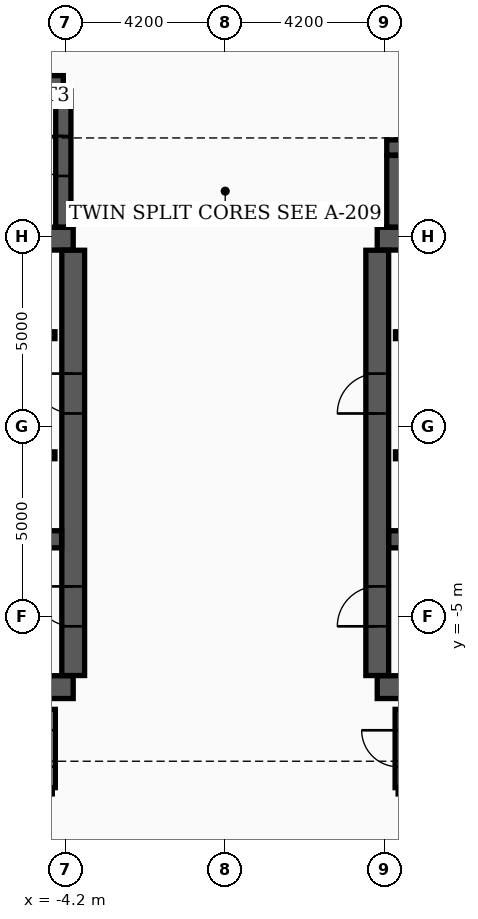
"""IFC4 building model, lengths in metres.
Left out: names, types, materials, properties, quantities, classifications, styles, units other than length and angle.
Written with IfcOpenShell. Run it as: python <this file> out.ifc"""

import sys

from ifc_helpers import new_model, si_unit, direction, frame, frame_2d, origin, place, context, subcontext, project, spatial, rectangle, extrude, element, fill, save


model = new_model("IFC4")
c1 = context("Model", 3, precision=1e-05, world=origin(), true_north=direction((0.0, 1.0)))
c2 = subcontext(c1, "Body", "Model", "MODEL_VIEW")
j1 = project(units=[si_unit("LENGTHUNIT", "METRE"), si_unit("PLANEANGLEUNIT", "RADIAN")], contexts=[c1])
p1 = place(None, origin())
s1 = spatial("IfcSite", under=j1, at=p1, CompositionType="ELEMENT")
p2 = place(p1, origin())
s2 = spatial("IfcBuilding", under=s1, at=p2, CompositionType="ELEMENT")
p3 = place(p2, frame((0.0, 0.0, 160.5)))
s3 = spatial("IfcBuildingStorey", under=s2, at=p3, CompositionType="ELEMENT", Elevation=160.5)
for number, where, z_axis, x_axis in (
    (1, (-12.4, -6.85, 0.0), (0.0, 0.0, 1.0), (1.0, 0.0, 0.0)),
    (2, (-12.4, 4.95, 0.0), (0.0, 0.0, 1.0), (1.0, 0.0, 0.0)),
):
    element("IfcWall", number, at=place(p3, frame(where, z_axis=z_axis, x_axis=x_axis)), inside=s3, PredefinedType="SHEAR", context=c2, shape_type="SweptSolid", body=[
        extrude(rectangle(XDim=8.4, YDim=0.6, at=frame_2d((4.2, 0.0))), origin(), (0.0, 0.0, 1.0), 3.7),
    ])
p4 = place(p3, frame((-4.0, -6.545, 0.0), z_axis=(0.0, 0.0, 1.0), x_axis=(0.0, 1.0, 0.0)))
e3 = element("IfcWall", 3, at=p4, inside=s3, PredefinedType="SHEAR", context=c2, shape_type="SweptSolid", body=[
    extrude(rectangle(XDim=11.19, YDim=0.6, at=frame_2d((5.595, 0.0))), origin(), (0.0, 0.0, 1.0), 3.7),
])
p5 = place(p4, frame((1.295, 0.0, 0.0)))
e4 = element("IfcOpeningElement", 4, at=p5, cuts=e3, PredefinedType="OPENING", context=c2, shape_type="SweptSolid", body=[
    extrude(rectangle(XDim=1.05, YDim=2.15, at=frame_2d((0.525, 1.075))), frame((0.0, 0.31, 0.0), z_axis=(0.0, -1.0, 0.0), x_axis=(1.0, 0.0, 0.0)), (0.0, 0.0, 1.0), 0.62),
])
p6 = place(p4, frame((6.895, 0.0, 0.0)))
e5 = element("IfcOpeningElement", 5, at=p6, cuts=e3, PredefinedType="OPENING", context=c2, shape_type="SweptSolid", body=[
    extrude(rectangle(XDim=1.05, YDim=2.15, at=frame_2d((0.525, 1.075))), frame((0.0, 0.31, 0.0), z_axis=(0.0, -1.0, 0.0), x_axis=(1.0, 0.0, 0.0)), (0.0, 0.0, 1.0), 0.62),
])
p7 = place(p3, frame((-12.095, -2.96, 0.0), z_axis=(0.0, 0.0, 1.0), x_axis=(1.0, 0.0, 0.0)))
e6 = element("IfcWall", 6, at=p7, inside=s3, PredefinedType="SHEAR", context=c2, shape_type="SweptSolid", body=[
    extrude(rectangle(XDim=7.79, YDim=0.45, at=frame_2d((3.895, 0.0))), origin(), (0.0, 0.0, 1.0), 3.7),
])
for number, where, z_axis, x_axis in (
    (7, (4.0, -6.85, 0.0), (0.0, 0.0, 1.0), (1.0, 0.0, 0.0)),
    (8, (4.0, 4.95, 0.0), (0.0, 0.0, 1.0), (1.0, 0.0, 0.0)),
):
    element("IfcWall", number, at=place(p3, frame(where, z_axis=z_axis, x_axis=x_axis)), inside=s3, PredefinedType="SHEAR", context=c2, shape_type="SweptSolid", body=[
        extrude(rectangle(XDim=8.4, YDim=0.6, at=frame_2d((4.2, 0.0))), origin(), (0.0, 0.0, 1.0), 3.7),
    ])
p8 = place(p3, frame((4.0, -6.545, 0.0), z_axis=(0.0, 0.0, 1.0), x_axis=(0.0, 1.0, 0.0)))
e9 = element("IfcWall", 9, at=p8, inside=s3, PredefinedType="SHEAR", context=c2, shape_type="SweptSolid", body=[
    extrude(rectangle(XDim=11.19, YDim=0.6, at=frame_2d((5.595, 0.0))), origin(), (0.0, 0.0, 1.0), 3.7),
])
p9 = place(p8, frame((1.295, 0.0, 0.0)))
e10 = element("IfcOpeningElement", 10, at=p9, cuts=e9, PredefinedType="OPENING", context=c2, shape_type="SweptSolid", body=[
    extrude(rectangle(XDim=1.05, YDim=2.15, at=frame_2d((0.525, 1.075))), frame((0.0, 0.31, 0.0), z_axis=(0.0, -1.0, 0.0), x_axis=(1.0, 0.0, 0.0)), (0.0, 0.0, 1.0), 0.62),
])
p10 = place(p8, frame((6.895, 0.0, 0.0)))
e11 = element("IfcOpeningElement", 11, at=p10, cuts=e9, PredefinedType="OPENING", context=c2, shape_type="SweptSolid", body=[
    extrude(rectangle(XDim=1.05, YDim=2.15, at=frame_2d((0.525, 1.075))), frame((0.0, 0.31, 0.0), z_axis=(0.0, -1.0, 0.0), x_axis=(1.0, 0.0, 0.0)), (0.0, 0.0, 1.0), 0.62),
])
p11 = place(p3, frame((4.305, -2.96, 0.0), z_axis=(0.0, 0.0, 1.0), x_axis=(1.0, 0.0, 0.0)))
e12 = element("IfcWall", 12, at=p11, inside=s3, PredefinedType="SHEAR", context=c2, shape_type="SweptSolid", body=[
    extrude(rectangle(XDim=7.79, YDim=0.45, at=frame_2d((3.895, 0.0))), origin(), (0.0, 0.0, 1.0), 3.7),
])
p12 = place(p3, frame((-12.22, 9.04, 0.0), z_axis=(0.0, 0.0, 1.0), x_axis=(1.0, 0.0, 0.0)))
e13 = element("IfcWall", 13, at=p12, inside=s3, PredefinedType="SHEAR", context=c2, shape_type="SweptSolid", body=[
    extrude(rectangle(XDim=7.96, YDim=0.4, at=frame_2d((3.98, 0.0))), origin(), (0.0, 0.0, 1.0), 3.7),
])
p13 = place(p3, frame((-4.26, 5.255, 0.0), z_axis=(0.0, 0.0, 1.0), x_axis=(0.0, 1.0, 0.0)))
e14 = element("IfcWall", 14, at=p13, inside=s3, PredefinedType="SHEAR", context=c2, shape_type="SweptSolid", body=[
    extrude(rectangle(XDim=3.58, YDim=0.4, at=frame_2d((1.79, 0.0))), origin(), (0.0, 0.0, 1.0), 3.7),
])
p14 = place(p13, frame((1.345, 0.0, 0.0)))
e15 = element("IfcOpeningElement", 15, at=p14, cuts=e14, PredefinedType="OPENING", context=c2, shape_type="SweptSolid", body=[
    extrude(rectangle(XDim=1.05, YDim=2.15, at=frame_2d((0.525, 1.075))), frame((0.0, 0.21, 0.0), z_axis=(0.0, -1.0, 0.0), x_axis=(1.0, 0.0, 0.0)), (0.0, 0.0, 1.0), 0.42),
])
p15 = place(p3, frame((4.45, 5.255, 0.0), z_axis=(0.0, 0.0, 1.0), x_axis=(0.0, 1.0, 0.0)))
e16 = element("IfcWall", 16, at=p15, inside=s3, PredefinedType="SHEAR", context=c2, shape_type="SweptSolid", body=[
    extrude(rectangle(XDim=1.885, YDim=0.4, at=frame_2d((0.942, 0.0))), origin(), (0.0, 0.0, 1.0), 3.7),
])
p16 = place(p3, frame((4.25, 7.35, 0.0), z_axis=(0.0, 0.0, 1.0), x_axis=(1.0, 0.0, 0.0)))
e17 = element("IfcWall", 17, at=p16, inside=s3, PredefinedType="SHEAR", context=c2, shape_type="SweptSolid", body=[
    extrude(rectangle(XDim=5.4, YDim=0.4, at=frame_2d((2.7, 0.0))), origin(), (0.0, 0.0, 1.0), 3.7),
])
p17 = place(p3, frame((-11.9, 2.41, 0.0), z_axis=(0.0, 0.0, 1.0), x_axis=(1.0, 0.0, 0.0)))
e18 = element("IfcWall", 18, at=p17, inside=s3, PredefinedType="SOLIDWALL", context=c2, shape_type="SweptSolid", body=[
    extrude(rectangle(XDim=7.42, YDim=0.18, at=frame_2d((3.71, 0.0))), origin(), (0.0, 0.0, 1.0), 2.96),
])
p18 = place(p17, frame((0.55, 0.0, 0.0)))
e19 = element("IfcOpeningElement", 19, at=p18, cuts=e18, PredefinedType="OPENING", context=c2, shape_type="SweptSolid", body=[
    extrude(rectangle(XDim=1.1, YDim=2.15, at=frame_2d((0.55, 1.075))), frame((0.0, 0.1, 0.0), z_axis=(0.0, -1.0, 0.0), x_axis=(1.0, 0.0, 0.0)), (0.0, 0.0, 1.0), 0.2),
])
p19 = place(p17, frame((4.9, 0.0, 0.0)))
e20 = element("IfcOpeningElement", 20, at=p19, cuts=e18, PredefinedType="OPENING", context=c2, shape_type="SweptSolid", body=[
    extrude(rectangle(XDim=0.88, YDim=2.1, at=frame_2d((0.44, 1.05))), frame((0.0, 0.1, 0.0), z_axis=(0.0, -1.0, 0.0), x_axis=(1.0, 0.0, 0.0)), (0.0, 0.0, 1.0), 0.2),
])
p20 = place(p3, frame((4.48, 2.41, 0.0), z_axis=(0.0, 0.0, 1.0), x_axis=(1.0, 0.0, 0.0)))
e21 = element("IfcWall", 21, at=p20, inside=s3, PredefinedType="SOLIDWALL", context=c2, shape_type="SweptSolid", body=[
    extrude(rectangle(XDim=7.42, YDim=0.18, at=frame_2d((3.71, 0.0))), origin(), (0.0, 0.0, 1.0), 2.96),
])
p21 = place(p20, frame((5.67, 0.0, 0.0)))
e22 = element("IfcOpeningElement", 22, at=p21, cuts=e21, PredefinedType="OPENING", context=c2, shape_type="SweptSolid", body=[
    extrude(rectangle(XDim=1.1, YDim=2.15, at=frame_2d((0.55, 1.075))), frame((0.0, 0.1, 0.0), z_axis=(0.0, -1.0, 0.0), x_axis=(1.0, 0.0, 0.0)), (0.0, 0.0, 1.0), 0.2),
])
p22 = place(p20, frame((1.6, 0.0, 0.0)))
e23 = element("IfcOpeningElement", 23, at=p22, cuts=e21, PredefinedType="OPENING", context=c2, shape_type="SweptSolid", body=[
    extrude(rectangle(XDim=0.88, YDim=2.1, at=frame_2d((0.44, 1.05))), frame((0.0, 0.1, 0.0), z_axis=(0.0, -1.0, 0.0), x_axis=(1.0, 0.0, 0.0)), (0.0, 0.0, 1.0), 0.2),
])
p23 = place(p3, frame((-11.9, -0.75, 0.0), z_axis=(0.0, 0.0, 1.0), x_axis=(1.0, 0.0, 0.0)))
e24 = element("IfcWall", 24, at=p23, inside=s3, PredefinedType="SOLIDWALL", context=c2, shape_type="SweptSolid", body=[
    extrude(rectangle(XDim=7.42, YDim=0.18, at=frame_2d((3.71, 0.0))), origin(), (0.0, 0.0, 1.0), 2.96),
])
p24 = place(p23, frame((0.45, 0.0, 0.0)))
e25 = element("IfcOpeningElement", 25, at=p24, cuts=e24, PredefinedType="OPENING", context=c2, shape_type="SweptSolid", body=[
    extrude(rectangle(XDim=1.1, YDim=2.15, at=frame_2d((0.55, 1.075))), frame((0.0, 0.1, 0.0), z_axis=(0.0, -1.0, 0.0), x_axis=(1.0, 0.0, 0.0)), (0.0, 0.0, 1.0), 0.2),
])
p25 = place(p23, frame((2.35, 0.0, 0.0)))
e26 = element("IfcOpeningElement", 26, at=p25, cuts=e24, PredefinedType="OPENING", context=c2, shape_type="SweptSolid", body=[
    extrude(rectangle(XDim=1.1, YDim=2.15, at=frame_2d((0.55, 1.075))), frame((0.0, 0.1, 0.0), z_axis=(0.0, -1.0, 0.0), x_axis=(1.0, 0.0, 0.0)), (0.0, 0.0, 1.0), 0.2),
])
p26 = place(p3, frame((4.48, -0.75, 0.0), z_axis=(0.0, 0.0, 1.0), x_axis=(1.0, 0.0, 0.0)))
e27 = element("IfcWall", 27, at=p26, inside=s3, PredefinedType="SOLIDWALL", context=c2, shape_type="SweptSolid", body=[
    extrude(rectangle(XDim=7.42, YDim=0.18, at=frame_2d((3.71, 0.0))), origin(), (0.0, 0.0, 1.0), 2.96),
])
p27 = place(p26, frame((0.52, 0.0, 0.0)))
e28 = element("IfcOpeningElement", 28, at=p27, cuts=e27, PredefinedType="OPENING", context=c2, shape_type="SweptSolid", body=[
    extrude(rectangle(XDim=1.1, YDim=2.15, at=frame_2d((0.55, 1.075))), frame((0.0, 0.1, 0.0), z_axis=(0.0, -1.0, 0.0), x_axis=(1.0, 0.0, 0.0)), (0.0, 0.0, 1.0), 0.2),
])
p28 = place(p3, frame((4.55, -9.58, 0.0), z_axis=(0.0, 0.0, 1.0), x_axis=(1.0, 0.0, 0.0)))
e29 = element("IfcWall", 29, at=p28, inside=s3, PredefinedType="PARTITIONING", context=c2, shape_type="SweptSolid", body=[
    extrude(rectangle(XDim=8.1, YDim=0.16, at=frame_2d((4.05, 0.0))), origin(), (0.0, 0.0, 1.0), 2.96),
])
p29 = place(p3, frame((4.55, -9.495, 0.0), z_axis=(0.0, 0.0, 1.0), x_axis=(0.0, 1.0, 0.0)))
e30 = element("IfcWall", 30, at=p29, inside=s3, PredefinedType="PARTITIONING", context=c2, shape_type="SweptSolid", body=[
    extrude(rectangle(XDim=2.06, YDim=0.16, at=frame_2d((1.03, 0.0))), origin(), (0.0, 0.0, 1.0), 2.96),
])
p30 = place(p29, frame((0.55, 0.0, 0.0)))
e31 = element("IfcOpeningElement", 31, at=p30, cuts=e30, PredefinedType="OPENING", context=c2, shape_type="SweptSolid", body=[
    extrude(rectangle(XDim=0.96, YDim=2.15, at=frame_2d((0.48, 1.075))), frame((0.0, 0.09, 0.0), z_axis=(0.0, -1.0, 0.0), x_axis=(1.0, 0.0, 0.0)), (0.0, 0.0, 1.0), 0.18),
])
p31 = place(p3, frame((-4.55, -9.495, 0.0), z_axis=(0.0, 0.0, 1.0), x_axis=(0.0, 1.0, 0.0)))
e32 = element("IfcWall", 32, at=p31, inside=s3, PredefinedType="PARTITIONING", context=c2, shape_type="SweptSolid", body=[
    extrude(rectangle(XDim=2.06, YDim=0.16, at=frame_2d((1.03, 0.0))), origin(), (0.0, 0.0, 1.0), 2.96),
])
p32 = place(p31, frame((0.55, 0.0, 0.0)))
e33 = element("IfcOpeningElement", 33, at=p32, cuts=e32, PredefinedType="OPENING", context=c2, shape_type="SweptSolid", body=[
    extrude(rectangle(XDim=0.96, YDim=2.15, at=frame_2d((0.48, 1.075))), frame((0.0, 0.09, 0.0), z_axis=(0.0, -1.0, 0.0), x_axis=(1.0, 0.0, 0.0)), (0.0, 0.0, 1.0), 0.18),
])
p33 = place(p5, origin())
e34 = element("IfcDoor", 34, at=p33, inside=s3, OperationType="SINGLE_SWING_RIGHT", PredefinedType="DOOR", context=c2, shape_type="SweptSolid", body=[
    extrude(rectangle(XDim=1.05, YDim=2.15, at=frame_2d((0.525, 1.075))), frame((0.0, 0.025, 0.0), z_axis=(0.0, -1.0, 0.0), x_axis=(1.0, 0.0, 0.0)), (0.0, 0.0, 1.0), 0.05),
])
fill(e4, e34)
p34 = place(p9, origin())
e35 = element("IfcDoor", 35, at=p34, inside=s3, OperationType="SINGLE_SWING_LEFT", PredefinedType="DOOR", context=c2, shape_type="SweptSolid", body=[
    extrude(rectangle(XDim=1.05, YDim=2.15, at=frame_2d((0.525, 1.075))), frame((0.0, 0.025, 0.0), z_axis=(0.0, -1.0, 0.0), x_axis=(1.0, 0.0, 0.0)), (0.0, 0.0, 1.0), 0.05),
])
fill(e10, e35)
p35 = place(p6, origin())
e36 = element("IfcDoor", 36, at=p35, inside=s3, OperationType="SINGLE_SWING_RIGHT", PredefinedType="DOOR", context=c2, shape_type="SweptSolid", body=[
    extrude(rectangle(XDim=1.05, YDim=2.15, at=frame_2d((0.525, 1.075))), frame((0.0, 0.025, 0.0), z_axis=(0.0, -1.0, 0.0), x_axis=(1.0, 0.0, 0.0)), (0.0, 0.0, 1.0), 0.05),
])
fill(e5, e36)
p36 = place(p10, origin())
e37 = element("IfcDoor", 37, at=p36, inside=s3, OperationType="SINGLE_SWING_LEFT", PredefinedType="DOOR", context=c2, shape_type="SweptSolid", body=[
    extrude(rectangle(XDim=1.05, YDim=2.15, at=frame_2d((0.525, 1.075))), frame((0.0, 0.025, 0.0), z_axis=(0.0, -1.0, 0.0), x_axis=(1.0, 0.0, 0.0)), (0.0, 0.0, 1.0), 0.05),
])
fill(e11, e37)
p37 = place(p14, origin())
e38 = element("IfcDoor", 38, at=p37, inside=s3, OperationType="SINGLE_SWING_RIGHT", PredefinedType="DOOR", context=c2, shape_type="SweptSolid", body=[
    extrude(rectangle(XDim=1.05, YDim=2.15, at=frame_2d((0.525, 1.075))), frame((0.0, 0.025, 0.0), z_axis=(0.0, -1.0, 0.0), x_axis=(1.0, 0.0, 0.0)), (0.0, 0.0, 1.0), 0.05),
])
fill(e15, e38)
p38 = place(p30, origin())
e39 = element("IfcDoor", 39, at=p38, inside=s3, OperationType="SINGLE_SWING_RIGHT", PredefinedType="DOOR", context=c2, shape_type="SweptSolid", body=[
    extrude(rectangle(XDim=0.96, YDim=2.15, at=frame_2d((0.48, 1.075))), frame((0.0, 0.025, 0.0), z_axis=(0.0, -1.0, 0.0), x_axis=(1.0, 0.0, 0.0)), (0.0, 0.0, 1.0), 0.05),
])
fill(e31, e39)
p39 = place(p32, origin())
e40 = element("IfcDoor", 40, at=p39, inside=s3, OperationType="SINGLE_SWING_LEFT", PredefinedType="DOOR", context=c2, shape_type="SweptSolid", body=[
    extrude(rectangle(XDim=0.96, YDim=2.15, at=frame_2d((0.48, 1.075))), frame((0.0, 0.025, 0.0), z_axis=(0.0, -1.0, 0.0), x_axis=(1.0, 0.0, 0.0)), (0.0, 0.0, 1.0), 0.05),
])
fill(e33, e40)
save(model, sys.argv[1])
